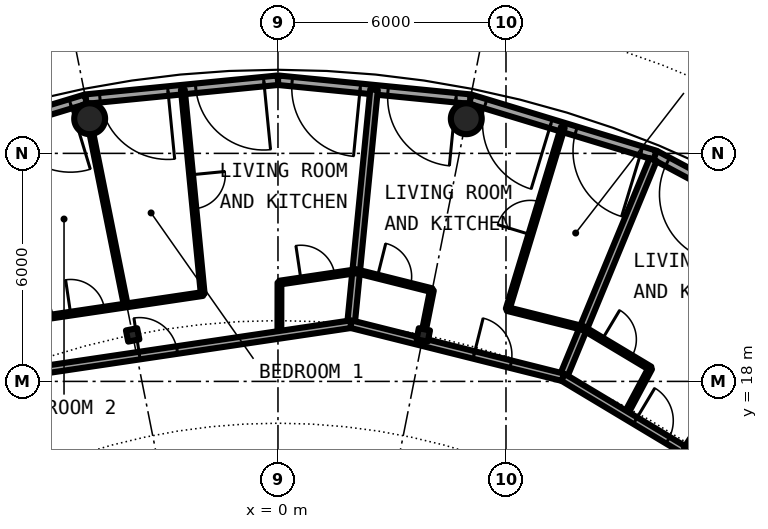
"""IFC4 building model, lengths in metres.
Left out: names, types, materials, properties, quantities, classifications, styles, units other than length and angle.
Written with IfcOpenShell. Run it as: python <this file> out.ifc"""

import sys

from ifc_helpers import new_model, si_unit, direction, frame, frame_2d, origin, origin_2d, place, context, subcontext, project, spatial, rectangle, hollow_circle, i_section, extrude, element, fill, save


model = new_model("IFC4")
c1 = context("Model", 3, precision=1e-05, world=origin(), true_north=direction((0.0, 1.0)))
c2 = subcontext(c1, "Body", "Model", "MODEL_VIEW")
j1 = project(units=[si_unit("LENGTHUNIT", "METRE"), si_unit("PLANEANGLEUNIT", "RADIAN")], contexts=[c1])
p1 = place(None, origin())
s1 = spatial("IfcSite", under=j1, at=p1, CompositionType="ELEMENT")
p2 = place(p1, origin())
s2 = spatial("IfcBuilding", under=s1, at=p2, CompositionType="ELEMENT")
p3 = place(p2, frame((0.0, 0.0, 237.1)))
s3 = spatial("IfcBuildingStorey", under=s2, at=p3, CompositionType="ELEMENT", Elevation=237.1)
for number, where, z_axis, x_axis in (
    (1, (4.955, 24.912, 0.0), (0.0, 0.0, 1.0), (1.0, 0.0, 0.0)),
    (2, (-4.955, 24.912, 0.0), (0.0, 0.0, 1.0), (1.0, 0.0, 0.0)),
):
    element("IfcColumn", number, at=place(p3, frame(where, z_axis=z_axis, x_axis=x_axis)), inside=s3, PredefinedType="COLUMN", context=c2, shape_type="SweptSolid", body=[
        extrude(hollow_circle(Radius=0.406, WallThickness=0.03, at=origin_2d()), origin(), (0.0, 0.0, 1.0), 3.05),
    ])
for number, where, z_axis, x_axis in (
    (3, (10.889, 16.297, 0.0), (0.0, 0.0, 1.0), (0.556, 0.831, 0.0)),
    (4, (3.824, 19.223, 0.0), (0.0, 0.0, 1.0), (0.195, 0.981, 0.0)),
    (5, (-3.824, 19.223, 0.0), (0.0, 0.0, 1.0), (-0.195, 0.981, 0.0)),
):
    element("IfcColumn", number, at=place(p3, frame(where, z_axis=z_axis, x_axis=x_axis)), inside=s3, PredefinedType="COLUMN", context=c2, shape_type="SweptSolid", body=[
        extrude(i_section(OverallWidth=0.3, OverallDepth=0.3, WebThickness=0.011, FlangeThickness=0.019, FilletRadius=0.027, at=origin_2d()), origin(), (0.0, 0.0, 1.0), 3.05),
    ])
p4 = place(p3, frame((14.403, 21.556, 0.0), z_axis=(0.0, 0.0, 1.0), x_axis=(-0.881903089468, 0.47143073806, 0.0)))
e6 = element("IfcWall", 6, at=p4, inside=s3, PredefinedType="SOLIDWALL", context=c2, shape_type="SweptSolid", body=[
    extrude(rectangle(XDim=5.082, YDim=0.25, at=frame_2d((2.541, 0.0))), origin(), (0.0, 0.0, 1.0), 2.7),
])
p5 = place(p4, frame((0.374, 0.0, 0.0)))
e7 = element("IfcOpeningElement", 7, at=p5, cuts=e6, PredefinedType="OPENING", context=c2, shape_type="SweptSolid", body=[
    extrude(rectangle(XDim=1.8, YDim=2.2, at=frame_2d((0.9, 1.1))), frame((0.0, 0.135, 0.0), z_axis=(0.0, -1.0, 0.0), x_axis=(1.0, 0.0, 0.0)), (0.0, 0.0, 1.0), 0.27),
])
p6 = place(p4, frame((2.909, 0.0, 0.0)))
e8 = element("IfcOpeningElement", 8, at=p6, cuts=e6, PredefinedType="OPENING", context=c2, shape_type="SweptSolid", body=[
    extrude(rectangle(XDim=1.8, YDim=2.2, at=frame_2d((0.9, 1.1))), frame((0.0, 0.135, 0.0), z_axis=(0.0, -1.0, 0.0), x_axis=(1.0, 0.0, 0.0)), (0.0, 0.0, 1.0), 0.27),
])
p7 = place(p3, frame((9.921, 23.952, 0.0), z_axis=(0.0, 0.0, 1.0), x_axis=(-0.956941126395, 0.290282070774, 0.0)))
e9 = element("IfcWall", 9, at=p7, inside=s3, PredefinedType="SOLIDWALL", context=c2, shape_type="SweptSolid", body=[
    extrude(rectangle(XDim=5.082, YDim=0.25, at=frame_2d((2.541, 0.0))), origin(), (0.0, 0.0, 1.0), 2.7),
])
p8 = place(p7, frame((0.374, 0.0, 0.0)))
e10 = element("IfcOpeningElement", 10, at=p8, cuts=e9, PredefinedType="OPENING", context=c2, shape_type="SweptSolid", body=[
    extrude(rectangle(XDim=1.8, YDim=2.2, at=frame_2d((0.9, 1.1))), frame((0.0, 0.135, 0.0), z_axis=(0.0, -1.0, 0.0), x_axis=(1.0, 0.0, 0.0)), (0.0, 0.0, 1.0), 0.27),
])
p9 = place(p7, frame((2.861, 0.0, 0.0)))
e11 = element("IfcOpeningElement", 11, at=p9, cuts=e9, PredefinedType="OPENING", context=c2, shape_type="SweptSolid", body=[
    extrude(rectangle(XDim=1.8, YDim=2.2, at=frame_2d((0.9, 1.1))), frame((0.0, 0.135, 0.0), z_axis=(0.0, -1.0, 0.0), x_axis=(1.0, 0.0, 0.0)), (0.0, 0.0, 1.0), 0.27),
])
p10 = place(p3, frame((5.058, 25.427, 0.0), z_axis=(0.0, 0.0, 1.0), x_axis=(-0.995187279479, 0.097991217788, 0.0)))
e12 = element("IfcWall", 12, at=p10, inside=s3, PredefinedType="SOLIDWALL", context=c2, shape_type="SweptSolid", body=[
    extrude(rectangle(XDim=5.083, YDim=0.25, at=frame_2d((2.541, 0.0))), origin(), (0.0, 0.0, 1.0), 2.7),
])
p11 = place(p10, frame((0.374, 0.0, 0.0)))
e13 = element("IfcOpeningElement", 13, at=p11, cuts=e12, PredefinedType="OPENING", context=c2, shape_type="SweptSolid", body=[
    extrude(rectangle(XDim=1.8, YDim=2.2, at=frame_2d((0.9, 1.1))), frame((0.0, 0.135, 0.0), z_axis=(0.0, -1.0, 0.0), x_axis=(1.0, 0.0, 0.0)), (0.0, 0.0, 1.0), 0.27),
])
p12 = place(p10, frame((2.909, 0.0, 0.0)))
e14 = element("IfcOpeningElement", 14, at=p12, cuts=e12, PredefinedType="OPENING", context=c2, shape_type="SweptSolid", body=[
    extrude(rectangle(XDim=1.8, YDim=2.2, at=frame_2d((0.9, 1.1))), frame((0.0, 0.135, 0.0), z_axis=(0.0, -1.0, 0.0), x_axis=(1.0, 0.0, 0.0)), (0.0, 0.0, 1.0), 0.27),
])
p13 = place(p3, frame((0.0, 25.925, 0.0), z_axis=(0.0, 0.0, 1.0), x_axis=(-0.995187279479, -0.097991217788, 0.0)))
e15 = element("IfcWall", 15, at=p13, inside=s3, PredefinedType="SOLIDWALL", context=c2, shape_type="SweptSolid", body=[
    extrude(rectangle(XDim=5.083, YDim=0.25, at=frame_2d((2.541, 0.0))), origin(), (0.0, 0.0, 1.0), 2.7),
])
p14 = place(p13, frame((0.374, 0.0, 0.0)))
e16 = element("IfcOpeningElement", 16, at=p14, cuts=e15, PredefinedType="OPENING", context=c2, shape_type="SweptSolid", body=[
    extrude(rectangle(XDim=1.8, YDim=2.2, at=frame_2d((0.9, 1.1))), frame((0.0, 0.135, 0.0), z_axis=(0.0, -1.0, 0.0), x_axis=(1.0, 0.0, 0.0)), (0.0, 0.0, 1.0), 0.27),
])
p15 = place(p13, frame((2.909, 0.0, 0.0)))
e17 = element("IfcOpeningElement", 17, at=p15, cuts=e15, PredefinedType="OPENING", context=c2, shape_type="SweptSolid", body=[
    extrude(rectangle(XDim=1.8, YDim=2.2, at=frame_2d((0.9, 1.1))), frame((0.0, 0.135, 0.0), z_axis=(0.0, -1.0, 0.0), x_axis=(1.0, 0.0, 0.0)), (0.0, 0.0, 1.0), 0.27),
])
p16 = place(p3, frame((-5.058, 25.427, 0.0), z_axis=(0.0, 0.0, 1.0), x_axis=(-0.956941126395, -0.290282070774, 0.0)))
e18 = element("IfcWall", 18, at=p16, inside=s3, PredefinedType="SOLIDWALL", context=c2, shape_type="SweptSolid", body=[
    extrude(rectangle(XDim=5.082, YDim=0.25, at=frame_2d((2.541, 0.0))), origin(), (0.0, 0.0, 1.0), 2.7),
])
p17 = place(p16, frame((0.42, 0.0, 0.0)))
e19 = element("IfcOpeningElement", 19, at=p17, cuts=e18, PredefinedType="OPENING", context=c2, shape_type="SweptSolid", body=[
    extrude(rectangle(XDim=1.8, YDim=2.2, at=frame_2d((0.9, 1.1))), frame((0.0, 0.135, 0.0), z_axis=(0.0, -1.0, 0.0), x_axis=(1.0, 0.0, 0.0)), (0.0, 0.0, 1.0), 0.27),
])
p18 = place(p16, frame((2.909, 0.0, 0.0)))
e20 = element("IfcOpeningElement", 20, at=p18, cuts=e18, PredefinedType="OPENING", context=c2, shape_type="SweptSolid", body=[
    extrude(rectangle(XDim=1.8, YDim=2.2, at=frame_2d((0.9, 1.1))), frame((0.0, 0.135, 0.0), z_axis=(0.0, -1.0, 0.0), x_axis=(1.0, 0.0, 0.0)), (0.0, 0.0, 1.0), 0.27),
])
p19 = place(p3, frame((0.037, 19.226, 0.0), z_axis=(0.0, 0.0, 1.0), x_axis=(0.001422473668, 0.999998988284, 0.0)))
e21 = element("IfcWall", 21, at=p19, inside=s3, PredefinedType="PARTITIONING", context=c2, shape_type="SweptSolid", body=[
    extrude(rectangle(XDim=1.373, YDim=0.1, at=frame_2d((0.687, 0.0))), origin(), (0.0, 0.0, 1.0), 2.7),
])
p20 = place(p3, frame((7.501, 18.108, 0.0), z_axis=(0.0, 0.0, 1.0), x_axis=(0.382282230395, 0.924045613768, 0.0)))
e22 = element("IfcWall", 22, at=p20, inside=s3, PredefinedType="PARTITIONING", context=c2, shape_type="SweptSolid", body=[
    extrude(rectangle(XDim=6.2, YDim=0.2, at=frame_2d((3.1, 0.0))), origin(), (0.0, 0.0, 1.0), 2.7),
])
p21 = place(p3, frame((-4.907, 24.515, 0.0), z_axis=(0.0, 0.0, 1.0), x_axis=(0.196299631225, -0.980543958617, 0.0)))
e23 = element("IfcWall", 23, at=p21, inside=s3, PredefinedType="PARTITIONING", context=c2, shape_type="SweptSolid", body=[
    extrude(rectangle(XDim=4.605, YDim=0.1, at=frame_2d((2.303, 0.0))), origin(), (0.0, 0.0, 1.0), 2.7),
])
p22 = place(p3, frame((-2.504, 25.678, 0.0), z_axis=(0.0, 0.0, 1.0), x_axis=(0.096962417892, -0.995288043491, 0.0)))
e24 = element("IfcWall", 24, at=p22, inside=s3, PredefinedType="PARTITIONING", context=c2, shape_type="SweptSolid", body=[
    extrude(rectangle(XDim=5.403, YDim=0.1, at=frame_2d((2.702, 0.0))), origin(), (0.0, 0.0, 1.0), 2.7),
])
p23 = place(p22, frame((2.252, 0.0, 0.0)))
e25 = element("IfcOpeningElement", 25, at=p23, cuts=e24, PredefinedType="OPENING", context=c2, shape_type="SweptSolid", body=[
    extrude(rectangle(XDim=0.9, YDim=2.3, at=frame_2d((0.45, 1.15))), frame((0.0, 0.06, 0.0), z_axis=(0.0, -1.0, 0.0), x_axis=(1.0, 0.0, 0.0)), (0.0, 0.0, 1.0), 0.12),
])
p24 = place(p3, frame((1.921, 19.506, 0.0), z_axis=(0.0, 0.0, 1.0), x_axis=(0.097936222995, 0.995192693013, 0.0)))
e26 = element("IfcWall", 26, at=p24, inside=s3, PredefinedType="PARTITIONING", context=c2, shape_type="SweptSolid", body=[
    extrude(rectangle(XDim=6.2, YDim=0.2, at=frame_2d((3.1, 0.0))), origin(), (0.0, 0.0, 1.0), 2.7),
])
p25 = place(p3, frame((3.847, 19.372, 0.0), z_axis=(0.0, 0.0, 1.0), x_axis=(0.194771831703, 0.980848578311, 0.0)))
e27 = element("IfcWall", 27, at=p25, inside=s3, PredefinedType="PARTITIONING", context=c2, shape_type="SweptSolid", body=[
    extrude(rectangle(XDim=1.048, YDim=0.1, at=frame_2d((0.524, 0.0))), origin(), (0.0, 0.0, 1.0), 2.7),
])
p26 = place(p3, frame((6.044, 19.901, 0.0), z_axis=(0.0, 0.0, 1.0), x_axis=(0.290516718077, 0.956869916194, 0.0)))
e28 = element("IfcWall", 28, at=p26, inside=s3, PredefinedType="PARTITIONING", context=c2, shape_type="SweptSolid", body=[
    extrude(rectangle(XDim=5.002, YDim=0.1, at=frame_2d((2.501, 0.0))), origin(), (0.0, 0.0, 1.0), 2.7),
])
p27 = place(p26, frame((2.051, 0.0, 0.0)))
e29 = element("IfcOpeningElement", 29, at=p27, cuts=e28, PredefinedType="OPENING", context=c2, shape_type="SweptSolid", body=[
    extrude(rectangle(XDim=0.9, YDim=2.3, at=frame_2d((0.45, 1.15))), frame((0.0, 0.06, 0.0), z_axis=(0.0, -1.0, 0.0), x_axis=(1.0, 0.0, 0.0)), (0.0, 0.0, 1.0), 0.12),
])
p28 = place(p3, frame((9.145, 17.122, 0.0), z_axis=(0.0, 0.0, 1.0), x_axis=(0.471072596947, 0.882094444153, 0.0)))
e30 = element("IfcWall", 30, at=p28, inside=s3, PredefinedType="PARTITIONING", context=c2, shape_type="SweptSolid", body=[
    extrude(rectangle(XDim=1.386, YDim=0.1, at=frame_2d((0.693, 0.0))), origin(), (0.0, 0.0, 1.0), 2.7),
])
p29 = place(p3, frame((-7.506, 18.105, 0.0), z_axis=(0.0, 0.0, 1.0), x_axis=(0.989134446023, 0.147013767014, 0.0)))
e31 = element("IfcWall", 31, at=p29, inside=s3, PredefinedType="PARTITIONING", context=c2, shape_type="SweptSolid", body=[
    extrude(rectangle(XDim=9.531, YDim=0.2, at=frame_2d((4.765, 0.0))), origin(), (0.0, 0.0, 1.0), 2.45),
])
p30 = place(p29, frame((3.905, 0.0, 0.0)))
e32 = element("IfcOpeningElement", 32, at=p30, cuts=e31, PredefinedType="OPENING", context=c2, shape_type="SweptSolid", body=[
    extrude(rectangle(XDim=1.0, YDim=2.3, at=frame_2d((0.5, 1.15))), frame((0.0, 0.11, 0.0), z_axis=(0.0, -1.0, 0.0), x_axis=(1.0, 0.0, 0.0)), (0.0, 0.0, 1.0), 0.22),
])
p31 = place(p3, frame((1.921, 19.506, 0.0), z_axis=(0.0, 0.0, 1.0), x_axis=(0.970012544183, -0.243054858266, 0.0)))
e33 = element("IfcWall", 33, at=p31, inside=s3, PredefinedType="PARTITIONING", context=c2, shape_type="SweptSolid", body=[
    extrude(rectangle(XDim=5.753, YDim=0.2, at=frame_2d((2.876, 0.0))), origin(), (0.0, 0.0, 1.0), 2.45),
])
p32 = place(p31, frame((3.335, 0.0, 0.0)))
e34 = element("IfcOpeningElement", 34, at=p32, cuts=e33, PredefinedType="OPENING", context=c2, shape_type="SweptSolid", body=[
    extrude(rectangle(XDim=1.0, YDim=2.3, at=frame_2d((0.5, 1.15))), frame((0.0, 0.11, 0.0), z_axis=(0.0, -1.0, 0.0), x_axis=(1.0, 0.0, 0.0)), (0.0, 0.0, 1.0), 0.22),
])
p33 = place(p3, frame((7.501, 18.108, 0.0), z_axis=(0.0, 0.0, 1.0), x_axis=(0.857560257806, -0.514383518624, 0.0)))
e35 = element("IfcWall", 35, at=p33, inside=s3, PredefinedType="PARTITIONING", context=c2, shape_type="SweptSolid", body=[
    extrude(rectangle(XDim=5.758, YDim=0.2, at=frame_2d((2.879, 0.0))), origin(), (0.0, 0.0, 1.0), 2.45),
])
p34 = place(p33, frame((2.217, 0.0, 0.0)))
e36 = element("IfcOpeningElement", 36, at=p34, cuts=e35, PredefinedType="OPENING", context=c2, shape_type="SweptSolid", body=[
    extrude(rectangle(XDim=1.0, YDim=2.3, at=frame_2d((0.5, 1.15))), frame((0.0, 0.11, 0.0), z_axis=(0.0, -1.0, 0.0), x_axis=(1.0, 0.0, 0.0)), (0.0, 0.0, 1.0), 0.22),
])
p35 = place(p3, frame((-8.039, 19.399, 0.0), z_axis=(0.0, 0.0, 1.0), x_axis=(0.989150987706, 0.14690242857, 0.0)))
e37 = element("IfcWall", 37, at=p35, inside=s3, PredefinedType="PARTITIONING", context=c2, shape_type="SweptSolid", body=[
    extrude(rectangle(XDim=6.127, YDim=0.1, at=frame_2d((3.064, 0.0))), origin(), (0.0, 0.0, 1.0), 2.7),
])
p36 = place(p35, frame((2.611, 0.0, 0.0)))
e38 = element("IfcOpeningElement", 38, at=p36, cuts=e37, PredefinedType="OPENING", context=c2, shape_type="SweptSolid", body=[
    extrude(rectangle(XDim=0.9, YDim=2.3, at=frame_2d((0.45, 1.15))), frame((0.0, 0.06, 0.0), z_axis=(0.0, -1.0, 0.0), x_axis=(1.0, 0.0, 0.0)), (0.0, 0.0, 1.0), 0.12),
])
p37 = place(p35, frame((0.575, 0.0, 0.0)))
e39 = element("IfcOpeningElement", 39, at=p37, cuts=e37, PredefinedType="OPENING", context=c2, shape_type="SweptSolid", body=[
    extrude(rectangle(XDim=0.9, YDim=2.3, at=frame_2d((0.45, 1.15))), frame((0.0, 0.06, 0.0), z_axis=(0.0, -1.0, 0.0), x_axis=(1.0, 0.0, 0.0)), (0.0, 0.0, 1.0), 0.12),
])
p38 = place(p3, frame((0.039, 20.599, 0.0), z_axis=(0.0, 0.0, 1.0), x_axis=(0.989154601185, 0.146878095557, 0.0)))
e40 = element("IfcWall", 40, at=p38, inside=s3, PredefinedType="PARTITIONING", context=c2, shape_type="SweptSolid", body=[
    extrude(rectangle(XDim=2.041, YDim=0.1, at=frame_2d((1.021, 0.0))), origin(), (0.0, 0.0, 1.0), 2.7),
])
p39 = place(p38, frame((0.571, 0.0, 0.0)))
e41 = element("IfcOpeningElement", 41, at=p39, cuts=e40, PredefinedType="OPENING", context=c2, shape_type="SweptSolid", body=[
    extrude(rectangle(XDim=0.9, YDim=2.3, at=frame_2d((0.45, 1.15))), frame((0.0, 0.06, 0.0), z_axis=(0.0, -1.0, 0.0), x_axis=(1.0, 0.0, 0.0)), (0.0, 0.0, 1.0), 0.12),
])
p40 = place(p3, frame((2.058, 20.899, 0.0), z_axis=(0.0, 0.0, 1.0), x_axis=(0.970051558088, -0.24289910385, 0.0)))
e42 = element("IfcWall", 42, at=p40, inside=s3, PredefinedType="PARTITIONING", context=c2, shape_type="SweptSolid", body=[
    extrude(rectangle(XDim=2.054, YDim=0.1, at=frame_2d((1.027, 0.0))), origin(), (0.0, 0.0, 1.0), 2.7),
])
p41 = place(p40, frame((0.577, 0.0, 0.0)))
e43 = element("IfcOpeningElement", 43, at=p41, cuts=e42, PredefinedType="OPENING", context=c2, shape_type="SweptSolid", body=[
    extrude(rectangle(XDim=0.9, YDim=2.3, at=frame_2d((0.45, 1.15))), frame((0.0, 0.06, 0.0), z_axis=(0.0, -1.0, 0.0), x_axis=(1.0, 0.0, 0.0)), (0.0, 0.0, 1.0), 0.12),
])
p42 = place(p3, frame((6.032, 19.904, 0.0), z_axis=(0.0, 0.0, 1.0), x_axis=(0.970023493589, -0.243011155889, 0.0)))
e44 = element("IfcWall", 44, at=p42, inside=s3, PredefinedType="PARTITIONING", context=c2, shape_type="SweptSolid", body=[
    extrude(rectangle(XDim=2.053, YDim=0.1, at=frame_2d((1.027, 0.0))), origin(), (0.0, 0.0, 1.0), 2.7),
])
p43 = place(p3, frame((8.036, 19.401, 0.0), z_axis=(0.0, 0.0, 1.0), x_axis=(0.857838403859, -0.513919519832, 0.0)))
e45 = element("IfcWall", 45, at=p43, inside=s3, PredefinedType="PARTITIONING", context=c2, shape_type="SweptSolid", body=[
    extrude(rectangle(XDim=2.056, YDim=0.1, at=frame_2d((1.028, 0.0))), origin(), (0.0, 0.0, 1.0), 2.7),
])
p44 = place(p43, frame((0.577, 0.0, 0.0)))
e46 = element("IfcOpeningElement", 46, at=p44, cuts=e45, PredefinedType="OPENING", context=c2, shape_type="SweptSolid", body=[
    extrude(rectangle(XDim=0.9, YDim=2.3, at=frame_2d((0.45, 1.15))), frame((0.0, 0.06, 0.0), z_axis=(0.0, -1.0, 0.0), x_axis=(1.0, 0.0, 0.0)), (0.0, 0.0, 1.0), 0.12),
])
p45 = place(p6, origin())
e47 = element("IfcDoor", 47, at=p45, inside=s3, OperationType="SINGLE_SWING_LEFT", PredefinedType="DOOR", context=c2, shape_type="SweptSolid", body=[
    extrude(rectangle(XDim=1.8, YDim=2.2, at=frame_2d((0.9, 1.1))), frame((0.0, 0.025, 0.0), z_axis=(0.0, -1.0, 0.0), x_axis=(1.0, 0.0, 0.0)), (0.0, 0.0, 1.0), 0.05),
])
fill(e8, e47)
p46 = place(p8, origin())
e48 = element("IfcDoor", 48, at=p46, inside=s3, OperationType="SINGLE_SWING_LEFT", PredefinedType="DOOR", context=c2, shape_type="SweptSolid", body=[
    extrude(rectangle(XDim=1.8, YDim=2.2, at=frame_2d((0.9, 1.1))), frame((0.0, 0.025, 0.0), z_axis=(0.0, -1.0, 0.0), x_axis=(1.0, 0.0, 0.0)), (0.0, 0.0, 1.0), 0.05),
])
fill(e10, e48)
p47 = place(p9, origin())
e49 = element("IfcDoor", 49, at=p47, inside=s3, OperationType="SINGLE_SWING_LEFT", PredefinedType="DOOR", context=c2, shape_type="SweptSolid", body=[
    extrude(rectangle(XDim=1.8, YDim=2.2, at=frame_2d((0.9, 1.1))), frame((0.0, 0.025, 0.0), z_axis=(0.0, -1.0, 0.0), x_axis=(1.0, 0.0, 0.0)), (0.0, 0.0, 1.0), 0.05),
])
fill(e11, e49)
p48 = place(p11, origin())
e50 = element("IfcDoor", 50, at=p48, inside=s3, OperationType="SINGLE_SWING_LEFT", PredefinedType="DOOR", context=c2, shape_type="SweptSolid", body=[
    extrude(rectangle(XDim=1.8, YDim=2.2, at=frame_2d((0.9, 1.1))), frame((0.0, 0.025, 0.0), z_axis=(0.0, -1.0, 0.0), x_axis=(1.0, 0.0, 0.0)), (0.0, 0.0, 1.0), 0.05),
])
fill(e13, e50)
p49 = place(p12, origin())
e51 = element("IfcDoor", 51, at=p49, inside=s3, OperationType="SINGLE_SWING_LEFT", PredefinedType="DOOR", context=c2, shape_type="SweptSolid", body=[
    extrude(rectangle(XDim=1.8, YDim=2.2, at=frame_2d((0.9, 1.1))), frame((0.0, 0.025, 0.0), z_axis=(0.0, -1.0, 0.0), x_axis=(1.0, 0.0, 0.0)), (0.0, 0.0, 1.0), 0.05),
])
fill(e14, e51)
p50 = place(p14, origin())
e52 = element("IfcDoor", 52, at=p50, inside=s3, OperationType="SINGLE_SWING_LEFT", PredefinedType="DOOR", context=c2, shape_type="SweptSolid", body=[
    extrude(rectangle(XDim=1.8, YDim=2.2, at=frame_2d((0.9, 1.1))), frame((0.0, 0.025, 0.0), z_axis=(0.0, -1.0, 0.0), x_axis=(1.0, 0.0, 0.0)), (0.0, 0.0, 1.0), 0.05),
])
fill(e16, e52)
p51 = place(p15, origin())
e53 = element("IfcDoor", 53, at=p51, inside=s3, OperationType="SINGLE_SWING_LEFT", PredefinedType="DOOR", context=c2, shape_type="SweptSolid", body=[
    extrude(rectangle(XDim=1.8, YDim=2.2, at=frame_2d((0.9, 1.1))), frame((0.0, 0.025, 0.0), z_axis=(0.0, -1.0, 0.0), x_axis=(1.0, 0.0, 0.0)), (0.0, 0.0, 1.0), 0.05),
])
fill(e17, e53)
p52 = place(p17, origin())
e54 = element("IfcDoor", 54, at=p52, inside=s3, OperationType="SINGLE_SWING_LEFT", PredefinedType="DOOR", context=c2, shape_type="SweptSolid", body=[
    extrude(rectangle(XDim=1.8, YDim=2.2, at=frame_2d((0.9, 1.1))), frame((0.0, 0.025, 0.0), z_axis=(0.0, -1.0, 0.0), x_axis=(1.0, 0.0, 0.0)), (0.0, 0.0, 1.0), 0.05),
])
fill(e19, e54)
p53 = place(p34, origin())
e55 = element("IfcDoor", 55, at=p53, inside=s3, OperationType="SINGLE_SWING_LEFT", PredefinedType="DOOR", context=c2, shape_type="SweptSolid", body=[
    extrude(rectangle(XDim=1.0, YDim=2.3, at=frame_2d((0.5, 1.15))), frame((0.0, 0.025, 0.0), z_axis=(0.0, -1.0, 0.0), x_axis=(1.0, 0.0, 0.0)), (0.0, 0.0, 1.0), 0.05),
])
fill(e36, e55)
p54 = place(p44, origin())
e56 = element("IfcDoor", 56, at=p54, inside=s3, OperationType="SINGLE_SWING_LEFT", PredefinedType="DOOR", context=c2, shape_type="SweptSolid", body=[
    extrude(rectangle(XDim=0.9, YDim=2.3, at=frame_2d((0.45, 1.15))), frame((0.0, 0.025, 0.0), z_axis=(0.0, -1.0, 0.0), x_axis=(1.0, 0.0, 0.0)), (0.0, 0.0, 1.0), 0.05),
])
fill(e46, e56)
p55 = place(p32, origin())
e57 = element("IfcDoor", 57, at=p55, inside=s3, OperationType="SINGLE_SWING_RIGHT", PredefinedType="DOOR", context=c2, shape_type="SweptSolid", body=[
    extrude(rectangle(XDim=1.0, YDim=2.3, at=frame_2d((0.5, 1.15))), frame((0.0, 0.025, 0.0), z_axis=(0.0, -1.0, 0.0), x_axis=(1.0, 0.0, 0.0)), (0.0, 0.0, 1.0), 0.05),
])
fill(e34, e57)
p56 = place(p41, origin())
e58 = element("IfcDoor", 58, at=p56, inside=s3, OperationType="SINGLE_SWING_RIGHT", PredefinedType="DOOR", context=c2, shape_type="SweptSolid", body=[
    extrude(rectangle(XDim=0.9, YDim=2.3, at=frame_2d((0.45, 1.15))), frame((0.0, 0.025, 0.0), z_axis=(0.0, -1.0, 0.0), x_axis=(1.0, 0.0, 0.0)), (0.0, 0.0, 1.0), 0.05),
])
fill(e43, e58)
p57 = place(p27, origin())
e59 = element("IfcDoor", 59, at=p57, inside=s3, OperationType="SINGLE_SWING_LEFT", PredefinedType="DOOR", context=c2, shape_type="SweptSolid", body=[
    extrude(rectangle(XDim=0.9, YDim=2.3, at=frame_2d((0.45, 1.15))), frame((0.0, 0.025, 0.0), z_axis=(0.0, -1.0, 0.0), x_axis=(1.0, 0.0, 0.0)), (0.0, 0.0, 1.0), 0.05),
])
fill(e29, e59)
p58 = place(p30, origin())
e60 = element("IfcDoor", 60, at=p58, inside=s3, OperationType="SINGLE_SWING_LEFT", PredefinedType="DOOR", context=c2, shape_type="SweptSolid", body=[
    extrude(rectangle(XDim=1.0, YDim=2.3, at=frame_2d((0.5, 1.15))), frame((0.0, 0.025, 0.0), z_axis=(0.0, -1.0, 0.0), x_axis=(1.0, 0.0, 0.0)), (0.0, 0.0, 1.0), 0.05),
])
fill(e32, e60)
p59 = place(p39, origin())
e61 = element("IfcDoor", 61, at=p59, inside=s3, OperationType="SINGLE_SWING_RIGHT", PredefinedType="DOOR", context=c2, shape_type="SweptSolid", body=[
    extrude(rectangle(XDim=0.9, YDim=2.3, at=frame_2d((0.45, 1.15))), frame((0.0, 0.025, 0.0), z_axis=(0.0, -1.0, 0.0), x_axis=(1.0, 0.0, 0.0)), (0.0, 0.0, 1.0), 0.05),
])
fill(e41, e61)
p60 = place(p23, origin())
e62 = element("IfcDoor", 62, at=p60, inside=s3, OperationType="SINGLE_SWING_LEFT", PredefinedType="DOOR", context=c2, shape_type="SweptSolid", body=[
    extrude(rectangle(XDim=0.9, YDim=2.3, at=frame_2d((0.45, 1.15))), frame((0.0, 0.025, 0.0), z_axis=(0.0, -1.0, 0.0), x_axis=(1.0, 0.0, 0.0)), (0.0, 0.0, 1.0), 0.05),
])
fill(e25, e62)
p61 = place(p36, origin())
e63 = element("IfcDoor", 63, at=p61, inside=s3, OperationType="SINGLE_SWING_LEFT", PredefinedType="DOOR", context=c2, shape_type="SweptSolid", body=[
    extrude(rectangle(XDim=0.9, YDim=2.3, at=frame_2d((0.45, 1.15))), frame((0.0, 0.025, 0.0), z_axis=(0.0, -1.0, 0.0), x_axis=(1.0, 0.0, 0.0)), (0.0, 0.0, 1.0), 0.05),
])
fill(e38, e63)
save(model, sys.argv[1])
